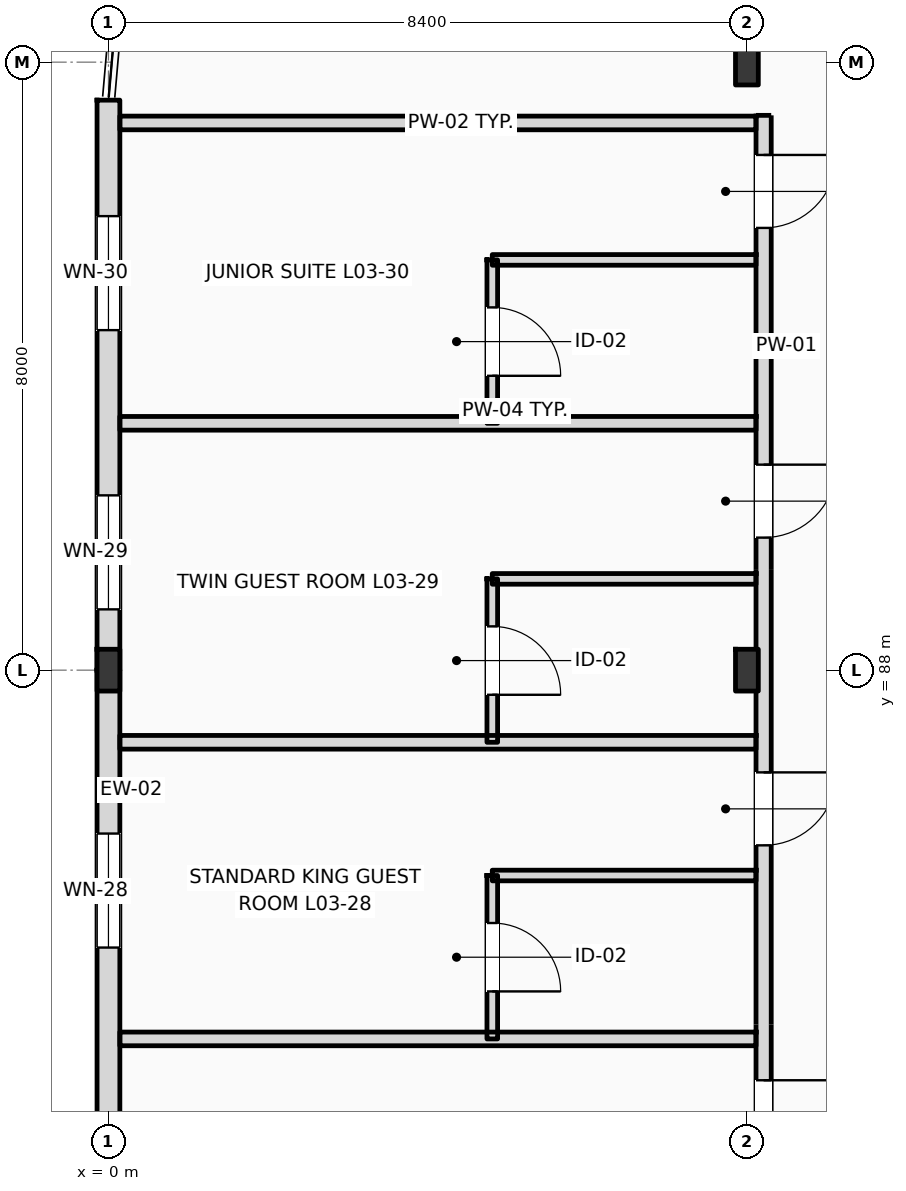
"""IFC4 building model, lengths in metres.
Left out: names, types, materials, properties, quantities, classifications, styles, units other than length and angle.
Written with IfcOpenShell. Run it as: python <this file> out.ifc"""

import sys

from ifc_helpers import new_model, si_unit, direction, frame, frame_2d, origin, origin_2d, place, context, subcontext, project, spatial, rectangle, i_section, extrude, element, fill, save


model = new_model("IFC4")
c1 = context("Model", 3, precision=1e-05, world=origin(), true_north=direction((0.0, 1.0)))
c2 = subcontext(c1, "Body", "Model", "MODEL_VIEW")
j1 = project(units=[si_unit("LENGTHUNIT", "METRE"), si_unit("PLANEANGLEUNIT", "RADIAN")], contexts=[c1])
p1 = place(None, origin())
s1 = spatial("IfcSite", under=j1, at=p1, CompositionType="ELEMENT")
p2 = place(p1, origin())
s2 = spatial("IfcBuilding", under=s1, at=p2, CompositionType="ELEMENT")
p3 = place(p2, frame((0.0, 0.0, 16.2)))
s3 = spatial("IfcBuildingStorey", under=s2, at=p3, CompositionType="ELEMENT", Elevation=16.2)
for number, where, z_axis, x_axis in (
    (1, (0.0, 88.0, 0.0), (0.0, 0.0, 1.0), (1.0, 0.0, 0.0)),
    (2, (8.4, 88.0, 0.0), (0.0, 0.0, 1.0), (1.0, 0.0, 0.0)),
):
    element("IfcColumn", number, at=place(p3, frame(where, z_axis=z_axis, x_axis=x_axis)), inside=s3, PredefinedType="COLUMN", context=c2, shape_type="SweptSolid", body=[
        extrude(i_section(OverallWidth=0.3, OverallDepth=0.55, WebThickness=0.015, FlangeThickness=0.029, FilletRadius=0.027, at=origin_2d()), origin(), (0.0, 0.0, 1.0), 4.2),
    ])
p4 = place(p3, frame((8.4, 96.0, 0.0), z_axis=(0.0, 0.0, 1.0), x_axis=(1.0, 0.0, 0.0)))
e3 = element("IfcColumn", 3, at=p4, inside=s3, PredefinedType="COLUMN", context=c2, shape_type="SweptSolid", body=[
    extrude(i_section(OverallWidth=0.3, OverallDepth=0.6, WebThickness=0.015, FlangeThickness=0.03, FilletRadius=0.027, at=origin_2d()), origin(), (0.0, 0.0, 1.0), 4.2),
])
p5 = place(p3, frame((0.0, 79.5, 0.0), z_axis=(0.0, 0.0, 1.0), x_axis=(0.0, 1.0, 0.0)))
e4 = element("IfcWall", 4, at=p5, inside=s3, PredefinedType="STANDARD", context=c2, shape_type="SweptSolid", body=[
    extrude(rectangle(XDim=8.5, YDim=0.3, at=frame_2d((4.25, 0.0))), origin(), (0.0, 0.0, 1.0), 3.51),
])
p6 = place(p5, frame((0.799, 0.0, 0.9)))
e5 = element("IfcOpeningElement", 5, at=p6, cuts=e4, PredefinedType="OPENING", context=c2, shape_type="SweptSolid", body=[
    extrude(rectangle(XDim=1.5, YDim=2.43, at=frame_2d((0.75, 1.215))), frame((0.0, 0.16, 0.0), z_axis=(0.0, -1.0, 0.0), x_axis=(1.0, 0.0, 0.0)), (0.0, 0.0, 1.0), 0.32),
])
p7 = place(p5, frame((4.85, 0.0, 0.9)))
e6 = element("IfcOpeningElement", 6, at=p7, cuts=e4, PredefinedType="OPENING", context=c2, shape_type="SweptSolid", body=[
    extrude(rectangle(XDim=1.5, YDim=2.43, at=frame_2d((0.75, 1.215))), frame((0.0, 0.16, 0.0), z_axis=(0.0, -1.0, 0.0), x_axis=(1.0, 0.0, 0.0)), (0.0, 0.0, 1.0), 0.32),
])
p8 = place(p3, frame((0.0, 88.0, 0.0), z_axis=(0.0, 0.0, 1.0), x_axis=(0.0, 1.0, 0.0)))
e7 = element("IfcWall", 7, at=p8, inside=s3, PredefinedType="STANDARD", context=c2, shape_type="SweptSolid", body=[
    extrude(rectangle(XDim=7.5, YDim=0.3, at=frame_2d((3.75, 0.0))), origin(), (0.0, 0.0, 1.0), 3.92),
])
p9 = place(p8, frame((0.8, 0.0, 0.9)))
e8 = element("IfcOpeningElement", 8, at=p9, cuts=e7, PredefinedType="OPENING", context=c2, shape_type="SweptSolid", body=[
    extrude(rectangle(XDim=1.5, YDim=2.84, at=frame_2d((0.75, 1.42))), frame((0.0, 0.16, 0.0), z_axis=(0.0, -1.0, 0.0), x_axis=(1.0, 0.0, 0.0)), (0.0, 0.0, 1.0), 0.32),
])
p10 = place(p8, frame((4.474, 0.0, 0.9)))
e9 = element("IfcOpeningElement", 9, at=p10, cuts=e7, PredefinedType="OPENING", context=c2, shape_type="SweptSolid", body=[
    extrude(rectangle(XDim=1.5, YDim=2.84, at=frame_2d((0.75, 1.42))), frame((0.0, 0.16, 0.0), z_axis=(0.0, -1.0, 0.0), x_axis=(1.0, 0.0, 0.0)), (0.0, 0.0, 1.0), 0.32),
])
p11 = place(p3, frame((8.62, 62.64, 0.0), z_axis=(0.0, 0.0, 1.0), x_axis=(0.0, 1.0, 0.0)))
e10 = element("IfcWall", 10, at=p11, inside=s3, PredefinedType="PARTITIONING", context=c2, shape_type="SweptSolid", body=[
    extrude(rectangle(XDim=32.66, YDim=0.2, at=frame_2d((16.33, 0.0))), origin(), (0.0, 0.0, 1.0), 3.51),
])
p12 = place(p11, frame((2.829, 0.0, 0.0)))
e11 = element("IfcOpeningElement", 11, at=p12, cuts=e10, PredefinedType="OPENING", context=c2, shape_type="SweptSolid", body=[
    extrude(rectangle(XDim=0.96, YDim=2.2, at=frame_2d((0.48, 1.1))), frame((0.0, 0.11, 0.0), z_axis=(0.0, -1.0, 0.0), x_axis=(1.0, 0.0, 0.0)), (0.0, 0.0, 1.0), 0.22),
])
p13 = place(p11, frame((4.704, 0.0, 0.0)))
e12 = element("IfcOpeningElement", 12, at=p13, cuts=e10, PredefinedType="OPENING", context=c2, shape_type="SweptSolid", body=[
    extrude(rectangle(XDim=0.96, YDim=2.2, at=frame_2d((0.48, 1.1))), frame((0.0, 0.11, 0.0), z_axis=(0.0, -1.0, 0.0), x_axis=(1.0, 0.0, 0.0)), (0.0, 0.0, 1.0), 0.22),
])
p14 = place(p11, frame((10.905, 0.0, 0.0)))
e13 = element("IfcOpeningElement", 13, at=p14, cuts=e10, PredefinedType="OPENING", context=c2, shape_type="SweptSolid", body=[
    extrude(rectangle(XDim=0.96, YDim=2.2, at=frame_2d((0.48, 1.1))), frame((0.0, 0.11, 0.0), z_axis=(0.0, -1.0, 0.0), x_axis=(1.0, 0.0, 0.0)), (0.0, 0.0, 1.0), 0.22),
])
p15 = place(p11, frame((14.954, 0.0, 0.0)))
e14 = element("IfcOpeningElement", 14, at=p15, cuts=e10, PredefinedType="OPENING", context=c2, shape_type="SweptSolid", body=[
    extrude(rectangle(XDim=0.96, YDim=2.2, at=frame_2d((0.48, 1.1))), frame((0.0, 0.11, 0.0), z_axis=(0.0, -1.0, 0.0), x_axis=(1.0, 0.0, 0.0)), (0.0, 0.0, 1.0), 0.22),
])
p16 = place(p11, frame((19.004, 0.0, 0.0)))
e15 = element("IfcOpeningElement", 15, at=p16, cuts=e10, PredefinedType="OPENING", context=c2, shape_type="SweptSolid", body=[
    extrude(rectangle(XDim=0.96, YDim=2.2, at=frame_2d((0.48, 1.1))), frame((0.0, 0.11, 0.0), z_axis=(0.0, -1.0, 0.0), x_axis=(1.0, 0.0, 0.0)), (0.0, 0.0, 1.0), 0.22),
])
p17 = place(p11, frame((23.055, 0.0, 0.0)))
e16 = element("IfcOpeningElement", 16, at=p17, cuts=e10, PredefinedType="OPENING", context=c2, shape_type="SweptSolid", body=[
    extrude(rectangle(XDim=0.96, YDim=2.2, at=frame_2d((0.48, 1.1))), frame((0.0, 0.11, 0.0), z_axis=(0.0, -1.0, 0.0), x_axis=(1.0, 0.0, 0.0)), (0.0, 0.0, 1.0), 0.22),
])
p18 = place(p11, frame((27.104, 0.0, 0.0)))
e17 = element("IfcOpeningElement", 17, at=p18, cuts=e10, PredefinedType="OPENING", context=c2, shape_type="SweptSolid", body=[
    extrude(rectangle(XDim=0.96, YDim=2.2, at=frame_2d((0.48, 1.1))), frame((0.0, 0.11, 0.0), z_axis=(0.0, -1.0, 0.0), x_axis=(1.0, 0.0, 0.0)), (0.0, 0.0, 1.0), 0.22),
])
p19 = place(p11, frame((31.179, 0.0, 0.0)))
e18 = element("IfcOpeningElement", 18, at=p19, cuts=e10, PredefinedType="OPENING", context=c2, shape_type="SweptSolid", body=[
    extrude(rectangle(XDim=0.96, YDim=2.2, at=frame_2d((0.48, 1.1))), frame((0.0, 0.11, 0.0), z_axis=(0.0, -1.0, 0.0), x_axis=(1.0, 0.0, 0.0)), (0.0, 0.0, 1.0), 0.22),
])
for number, where, z_axis, x_axis in (
    (19, (0.15, 83.148, 0.0), (0.0, 0.0, 1.0), (1.0, 0.0, 0.0)),
    (20, (0.15, 87.051, 0.0), (0.0, 0.0, 1.0), (1.0, 0.0, 0.0)),
):
    element("IfcWall", number, at=place(p3, frame(where, z_axis=z_axis, x_axis=x_axis)), inside=s3, PredefinedType="PARTITIONING", context=c2, shape_type="SweptSolid", body=[
        extrude(rectangle(XDim=8.37, YDim=0.18, at=frame_2d((4.185, 0.0))), origin(), (0.0, 0.0, 1.0), 3.92),
    ])
p20 = place(p3, frame((5.05, 85.298, 0.0), z_axis=(0.0, 0.0, 1.0), x_axis=(1.0, 0.0, 0.0)))
e21 = element("IfcWall", 21, at=p20, inside=s3, PredefinedType="PARTITIONING", context=c2, shape_type="SweptSolid", body=[
    extrude(rectangle(XDim=3.47, YDim=0.14, at=frame_2d((1.735, 0.0))), origin(), (0.0, 0.0, 1.0), 3.92),
])
p21 = place(p3, frame((5.05, 83.148, 0.0), z_axis=(0.0, 0.0, 1.0), x_axis=(0.0, 1.0, 0.0)))
e22 = element("IfcWall", 22, at=p21, inside=s3, PredefinedType="PARTITIONING", context=c2, shape_type="SweptSolid", body=[
    extrude(rectangle(XDim=2.15, YDim=0.14, at=frame_2d((1.075, 0.0))), origin(), (0.0, 0.0, 1.0), 3.92),
])
p22 = place(p21, frame((0.625, 0.0, 0.0)))
e23 = element("IfcOpeningElement", 23, at=p22, cuts=e22, PredefinedType="OPENING", context=c2, shape_type="SweptSolid", body=[
    extrude(rectangle(XDim=0.9, YDim=2.1, at=frame_2d((0.45, 1.05))), frame((0.0, 0.08, 0.0), z_axis=(0.0, -1.0, 0.0), x_axis=(1.0, 0.0, 0.0)), (0.0, 0.0, 1.0), 0.16),
])
p23 = place(p3, frame((0.15, 91.248, 0.0), z_axis=(0.0, 0.0, 1.0), x_axis=(1.0, 0.0, 0.0)))
e24 = element("IfcWall", 24, at=p23, inside=s3, PredefinedType="PARTITIONING", context=c2, shape_type="SweptSolid", body=[
    extrude(rectangle(XDim=8.37, YDim=0.18, at=frame_2d((4.185, 0.0))), origin(), (0.0, 0.0, 1.0), 3.92),
])
p24 = place(p3, frame((5.05, 89.201, 0.0), z_axis=(0.0, 0.0, 1.0), x_axis=(1.0, 0.0, 0.0)))
e25 = element("IfcWall", 25, at=p24, inside=s3, PredefinedType="PARTITIONING", context=c2, shape_type="SweptSolid", body=[
    extrude(rectangle(XDim=3.47, YDim=0.14, at=frame_2d((1.735, 0.0))), origin(), (0.0, 0.0, 1.0), 3.92),
])
p25 = place(p3, frame((5.05, 87.051, 0.0), z_axis=(0.0, 0.0, 1.0), x_axis=(0.0, 1.0, 0.0)))
e26 = element("IfcWall", 26, at=p25, inside=s3, PredefinedType="PARTITIONING", context=c2, shape_type="SweptSolid", body=[
    extrude(rectangle(XDim=2.15, YDim=0.14, at=frame_2d((1.075, 0.0))), origin(), (0.0, 0.0, 1.0), 3.92),
])
p26 = place(p25, frame((0.625, 0.0, 0.0)))
e27 = element("IfcOpeningElement", 27, at=p26, cuts=e26, PredefinedType="OPENING", context=c2, shape_type="SweptSolid", body=[
    extrude(rectangle(XDim=0.9, YDim=2.1, at=frame_2d((0.45, 1.05))), frame((0.0, 0.08, 0.0), z_axis=(0.0, -1.0, 0.0), x_axis=(1.0, 0.0, 0.0)), (0.0, 0.0, 1.0), 0.16),
])
p27 = place(p3, frame((0.15, 95.2, 0.0), z_axis=(0.0, 0.0, 1.0), x_axis=(1.0, 0.0, 0.0)))
e28 = element("IfcWall", 28, at=p27, inside=s3, PredefinedType="PARTITIONING", context=c2, shape_type="SweptSolid", body=[
    extrude(rectangle(XDim=8.37, YDim=0.18, at=frame_2d((4.185, 0.0))), origin(), (0.0, 0.0, 1.0), 3.92),
])
p28 = place(p3, frame((5.05, 93.398, 0.0), z_axis=(0.0, 0.0, 1.0), x_axis=(1.0, 0.0, 0.0)))
e29 = element("IfcWall", 29, at=p28, inside=s3, PredefinedType="PARTITIONING", context=c2, shape_type="SweptSolid", body=[
    extrude(rectangle(XDim=3.47, YDim=0.14, at=frame_2d((1.735, 0.0))), origin(), (0.0, 0.0, 1.0), 3.92),
])
p29 = place(p3, frame((5.05, 91.248, 0.0), z_axis=(0.0, 0.0, 1.0), x_axis=(0.0, 1.0, 0.0)))
e30 = element("IfcWall", 30, at=p29, inside=s3, PredefinedType="PARTITIONING", context=c2, shape_type="SweptSolid", body=[
    extrude(rectangle(XDim=2.15, YDim=0.14, at=frame_2d((1.075, 0.0))), origin(), (0.0, 0.0, 1.0), 3.92),
])
p30 = place(p29, frame((0.625, 0.0, 0.0)))
e31 = element("IfcOpeningElement", 31, at=p30, cuts=e30, PredefinedType="OPENING", context=c2, shape_type="SweptSolid", body=[
    extrude(rectangle(XDim=0.9, YDim=2.1, at=frame_2d((0.45, 1.05))), frame((0.0, 0.08, 0.0), z_axis=(0.0, -1.0, 0.0), x_axis=(1.0, 0.0, 0.0)), (0.0, 0.0, 1.0), 0.16),
])
p31 = place(p7, origin())
e32 = element("IfcWindow", 32, at=p31, inside=s3, PartitioningType="DOUBLE_PANEL_VERTICAL", PredefinedType="WINDOW", context=c2, shape_type="SweptSolid", body=[
    extrude(rectangle(XDim=1.5, YDim=2.43, at=frame_2d((0.75, 1.215))), frame((0.0, 0.03, 0.0), z_axis=(0.0, -1.0, 0.0), x_axis=(1.0, 0.0, 0.0)), (0.0, 0.0, 1.0), 0.06),
])
fill(e6, e32)
p32 = place(p9, origin())
e33 = element("IfcWindow", 33, at=p32, inside=s3, PartitioningType="DOUBLE_PANEL_VERTICAL", PredefinedType="WINDOW", context=c2, shape_type="SweptSolid", body=[
    extrude(rectangle(XDim=1.5, YDim=2.84, at=frame_2d((0.75, 1.42))), frame((0.0, 0.03, 0.0), z_axis=(0.0, -1.0, 0.0), x_axis=(1.0, 0.0, 0.0)), (0.0, 0.0, 1.0), 0.06),
])
fill(e8, e33)
p33 = place(p10, origin())
e34 = element("IfcWindow", 34, at=p33, inside=s3, PartitioningType="DOUBLE_PANEL_VERTICAL", PredefinedType="WINDOW", context=c2, shape_type="SweptSolid", body=[
    extrude(rectangle(XDim=1.5, YDim=2.84, at=frame_2d((0.75, 1.42))), frame((0.0, 0.03, 0.0), z_axis=(0.0, -1.0, 0.0), x_axis=(1.0, 0.0, 0.0)), (0.0, 0.0, 1.0), 0.06),
])
fill(e9, e34)
p34 = place(p16, frame((0.96, 0.0, 0.0), z_axis=(0.0, 0.0, 1.0), x_axis=(-1.0, 0.0, 0.0)))
e35 = element("IfcDoor", 35, at=p34, inside=s3, OperationType="SINGLE_SWING_RIGHT", PredefinedType="DOOR", context=c2, shape_type="SweptSolid", body=[
    extrude(rectangle(XDim=0.96, YDim=2.2, at=frame_2d((0.48, 1.1))), frame((0.0, 0.025, 0.0), z_axis=(0.0, -1.0, 0.0), x_axis=(1.0, 0.0, 0.0)), (0.0, 0.0, 1.0), 0.05),
])
fill(e15, e35)
p35 = place(p17, frame((0.96, 0.0, 0.0), z_axis=(0.0, 0.0, 1.0), x_axis=(-1.0, 0.0, 0.0)))
e36 = element("IfcDoor", 36, at=p35, inside=s3, OperationType="SINGLE_SWING_RIGHT", PredefinedType="DOOR", context=c2, shape_type="SweptSolid", body=[
    extrude(rectangle(XDim=0.96, YDim=2.2, at=frame_2d((0.48, 1.1))), frame((0.0, 0.025, 0.0), z_axis=(0.0, -1.0, 0.0), x_axis=(1.0, 0.0, 0.0)), (0.0, 0.0, 1.0), 0.05),
])
fill(e16, e36)
p36 = place(p22, frame((0.9, 0.0, 0.0), z_axis=(0.0, 0.0, 1.0), x_axis=(-1.0, 0.0, 0.0)))
e37 = element("IfcDoor", 37, at=p36, inside=s3, OperationType="SINGLE_SWING_LEFT", PredefinedType="DOOR", context=c2, shape_type="SweptSolid", body=[
    extrude(rectangle(XDim=0.9, YDim=2.1, at=frame_2d((0.45, 1.05))), frame((0.0, 0.025, 0.0), z_axis=(0.0, -1.0, 0.0), x_axis=(1.0, 0.0, 0.0)), (0.0, 0.0, 1.0), 0.05),
])
fill(e23, e37)
p37 = place(p18, frame((0.96, 0.0, 0.0), z_axis=(0.0, 0.0, 1.0), x_axis=(-1.0, 0.0, 0.0)))
e38 = element("IfcDoor", 38, at=p37, inside=s3, OperationType="SINGLE_SWING_RIGHT", PredefinedType="DOOR", context=c2, shape_type="SweptSolid", body=[
    extrude(rectangle(XDim=0.96, YDim=2.2, at=frame_2d((0.48, 1.1))), frame((0.0, 0.025, 0.0), z_axis=(0.0, -1.0, 0.0), x_axis=(1.0, 0.0, 0.0)), (0.0, 0.0, 1.0), 0.05),
])
fill(e17, e38)
p38 = place(p26, frame((0.9, 0.0, 0.0), z_axis=(0.0, 0.0, 1.0), x_axis=(-1.0, 0.0, 0.0)))
e39 = element("IfcDoor", 39, at=p38, inside=s3, OperationType="SINGLE_SWING_LEFT", PredefinedType="DOOR", context=c2, shape_type="SweptSolid", body=[
    extrude(rectangle(XDim=0.9, YDim=2.1, at=frame_2d((0.45, 1.05))), frame((0.0, 0.025, 0.0), z_axis=(0.0, -1.0, 0.0), x_axis=(1.0, 0.0, 0.0)), (0.0, 0.0, 1.0), 0.05),
])
fill(e27, e39)
p39 = place(p19, frame((0.96, 0.0, 0.0), z_axis=(0.0, 0.0, 1.0), x_axis=(-1.0, 0.0, 0.0)))
e40 = element("IfcDoor", 40, at=p39, inside=s3, OperationType="SINGLE_SWING_RIGHT", PredefinedType="DOOR", context=c2, shape_type="SweptSolid", body=[
    extrude(rectangle(XDim=0.96, YDim=2.2, at=frame_2d((0.48, 1.1))), frame((0.0, 0.025, 0.0), z_axis=(0.0, -1.0, 0.0), x_axis=(1.0, 0.0, 0.0)), (0.0, 0.0, 1.0), 0.05),
])
fill(e18, e40)
p40 = place(p30, frame((0.9, 0.0, 0.0), z_axis=(0.0, 0.0, 1.0), x_axis=(-1.0, 0.0, 0.0)))
e41 = element("IfcDoor", 41, at=p40, inside=s3, OperationType="SINGLE_SWING_LEFT", PredefinedType="DOOR", context=c2, shape_type="SweptSolid", body=[
    extrude(rectangle(XDim=0.9, YDim=2.1, at=frame_2d((0.45, 1.05))), frame((0.0, 0.025, 0.0), z_axis=(0.0, -1.0, 0.0), x_axis=(1.0, 0.0, 0.0)), (0.0, 0.0, 1.0), 0.05),
])
fill(e31, e41)
save(model, sys.argv[1])
